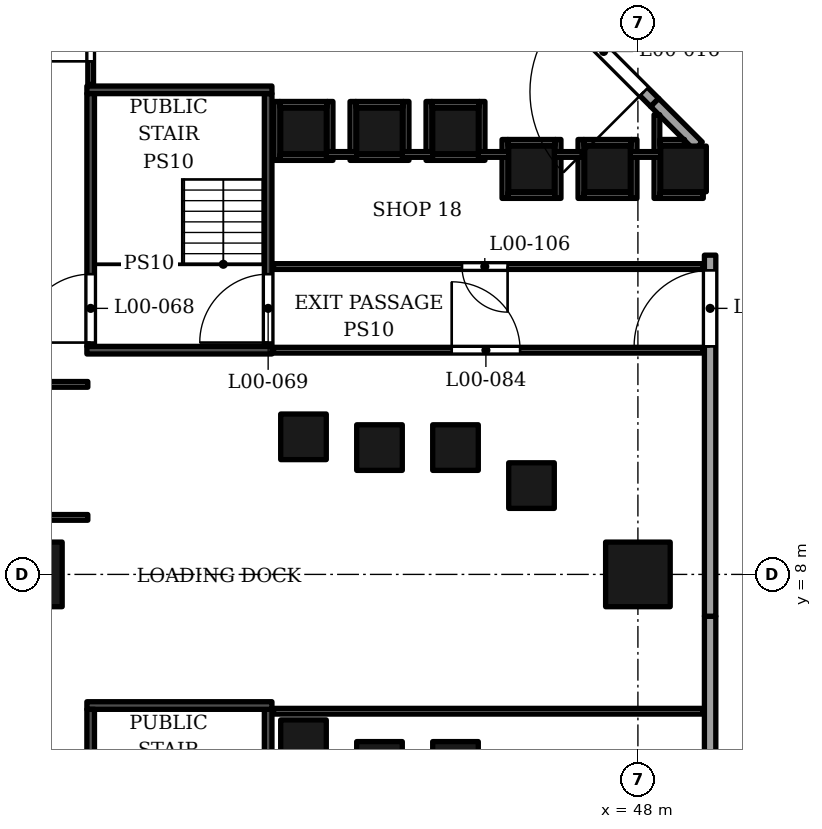
"""IFC4 building model, lengths in metres.
Left out: names, types, materials, properties, quantities, classifications, styles, units other than length and angle.
Written with IfcOpenShell. Run it as: python <this file> out.ifc"""

import sys

from ifc_helpers import new_model, si_unit, direction, frame, frame_2d, origin, origin_2d, place, context, subcontext, project, spatial, rectangle, extrude, element, fill, save


model = new_model("IFC4")
c1 = context("Model", 3, precision=1e-05, world=origin(), true_north=direction((0.0, 1.0)))
c2 = subcontext(c1, "Body", "Model", "MODEL_VIEW")
j1 = project(units=[si_unit("LENGTHUNIT", "METRE"), si_unit("PLANEANGLEUNIT", "RADIAN")], contexts=[c1])
p1 = place(None, origin())
s1 = spatial("IfcSite", under=j1, at=p1, CompositionType="ELEMENT")
p2 = place(p1, origin())
s2 = spatial("IfcBuilding", under=s1, at=p2, CompositionType="ELEMENT")
p3 = place(p2, origin())
s3 = spatial("IfcBuildingStorey", under=s2, at=p3, CompositionType="ELEMENT", Elevation=0.0)
for number, where, z_axis, x_axis in (
    (1, (32.0, 8.0, 0.0), (0.0, 0.0, 1.0), (1.0, 0.0, 0.0)),
    (2, (48.0, 8.0, 0.0), (0.0, 0.0, 1.0), (1.0, 0.0, 0.0)),
):
    element("IfcColumn", number, at=place(p3, frame(where, z_axis=z_axis, x_axis=x_axis)), inside=s3, PredefinedType="COLUMN", context=c2, shape_type="SweptSolid", body=[
        extrude(rectangle(XDim=1.7, YDim=1.7, at=origin_2d()), origin(), (0.0, 0.0, 1.0), 9.0),
    ])
for number, where, z_axis, x_axis in (
    (3, (39.2, 19.669, 0.0), (0.0, 0.0, 1.0), (1.0, 0.0, 0.0)),
    (4, (39.2, 11.62, 0.0), (0.0, 0.0, 1.0), (1.0, 0.0, 0.0)),
    (5, (39.2, 3.572, 0.0), (0.0, 0.0, 1.0), (1.0, 0.0, 0.0)),
    (6, (41.2, 19.669, 0.0), (0.0, 0.0, 1.0), (1.0, 0.0, 0.0)),
    (7, (41.2, 11.337, 0.0), (0.0, 0.0, 1.0), (1.0, 0.0, 0.0)),
    (8, (41.2, 3.001, 0.0), (0.0, 0.0, 1.0), (1.0, 0.0, 0.0)),
    (9, (43.2, 19.669, 0.0), (0.0, 0.0, 1.0), (1.0, 0.0, 0.0)),
    (10, (43.2, 11.337, 0.0), (0.0, 0.0, 1.0), (1.0, 0.0, 0.0)),
    (11, (43.2, 3.001, 0.0), (0.0, 0.0, 1.0), (1.0, 0.0, 0.0)),
    (12, (45.2, 18.669, 0.0), (0.0, 0.0, 1.0), (1.0, 0.0, 0.0)),
    (13, (45.2, 10.337, 0.0), (0.0, 0.0, 1.0), (1.0, 0.0, 0.0)),
    (14, (47.2, 18.669, 0.0), (0.0, 0.0, 1.0), (1.0, 0.0, 0.0)),
    (15, (49.2, 18.669, 0.0), (0.0, 0.0, 1.0), (1.0, 0.0, 0.0)),
):
    element("IfcColumn", number, at=place(p3, frame(where, z_axis=z_axis, x_axis=x_axis)), inside=s3, PredefinedType="COLUMN", context=c2, shape_type="SweptSolid", body=[
        extrude(rectangle(XDim=1.2, YDim=1.2, at=origin_2d()), origin(), (0.0, 0.0, 1.0), 9.0),
    ])
p4 = place(p3, frame((49.9, -2.523, 0.0), z_axis=(0.0, 0.0, 1.0), x_axis=(0.0, 1.0, 0.0)))
e16 = element("IfcWall", 16, at=p4, inside=s3, PredefinedType="ELEMENTEDWALL", context=c2, shape_type="SweptSolid", body=[
    extrude(rectangle(XDim=9.423, YDim=0.3, at=frame_2d((4.711, 0.0))), origin(), (0.0, 0.0, 1.0), 7.6),
])
p5 = place(p4, frame((0.323, 0.0, 0.0)))
e17 = element("IfcOpeningElement", 17, at=p5, cuts=e16, PredefinedType="OPENING", context=c2, shape_type="SweptSolid", body=[
    extrude(rectangle(XDim=2.0, YDim=2.4, at=frame_2d((1.0, 1.2))), frame((0.0, 0.16, 0.0), z_axis=(0.0, -1.0, 0.0), x_axis=(1.0, 0.0, 0.0)), (0.0, 0.0, 1.0), 0.32),
])
p6 = place(p3, frame((49.9, 6.9, 0.0), z_axis=(0.0, 0.0, 1.0), x_axis=(0.0, 1.0, 0.0)))
e18 = element("IfcWall", 18, at=p6, inside=s3, PredefinedType="ELEMENTEDWALL", context=c2, shape_type="SweptSolid", body=[
    extrude(rectangle(XDim=9.5, YDim=0.3, at=frame_2d((4.75, 0.0))), origin(), (0.0, 0.0, 1.0), 7.6),
])
p7 = place(p6, frame((7.1, 0.0, 0.0)))
e19 = element("IfcOpeningElement", 19, at=p7, cuts=e18, PredefinedType="OPENING", context=c2, shape_type="SweptSolid", body=[
    extrude(rectangle(XDim=2.0, YDim=2.4, at=frame_2d((1.0, 1.2))), frame((0.0, 0.16, 0.0), z_axis=(0.0, -1.0, 0.0), x_axis=(1.0, 0.0, 0.0)), (0.0, 0.0, 1.0), 0.32),
])
p8 = place(p3, frame((48.442, 20.417, 0.0), z_axis=(0.0, 0.0, 1.0), x_axis=(-0.707106781187, 0.707106781187, 0.0)))
e20 = element("IfcWall", 20, at=p8, inside=s3, PredefinedType="ELEMENTEDWALL", context=c2, shape_type="SweptSolid", body=[
    extrude(rectangle(XDim=3.8, YDim=0.3, at=frame_2d((1.9, 0.0))), origin(), (0.0, 0.0, 1.0), 7.6),
])
p9 = place(p8, frame((0.4, 0.0, 0.0)))
e21 = element("IfcOpeningElement", 21, at=p9, cuts=e20, PredefinedType="OPENING", context=c2, shape_type="SweptSolid", body=[
    extrude(rectangle(XDim=3.0, YDim=2.7, at=frame_2d((1.5, 1.35))), frame((0.0, 0.16, 0.0), z_axis=(0.0, -1.0, 0.0), x_axis=(1.0, 0.0, 0.0)), (0.0, 0.0, 1.0), 0.32),
])
p10 = place(p3, frame((49.588, 19.271, 0.0), z_axis=(0.0, 0.0, 1.0), x_axis=(-0.707106781187, 0.707106781187, 0.0)))
e22 = element("IfcWall", 22, at=p10, inside=s3, PredefinedType="SOLIDWALL", context=c2, shape_type="SweptSolid", body=[
    extrude(rectangle(XDim=1.62, YDim=0.3, at=frame_2d((0.81, 0.0))), origin(), (0.0, 0.0, 1.0), 7.6),
])
for number, where, z_axis, x_axis in (
    (23, (49.85, -10.395, 9.0), (0.0, 0.0, 1.0), (0.0, 1.0, 0.0)),
    (24, (49.85, 4.302, 9.0), (0.0, 0.0, 1.0), (0.0, 1.0, 0.0)),
):
    element("IfcWall", number, at=place(p3, frame(where, z_axis=z_axis, x_axis=x_axis)), inside=s3, PredefinedType="PARAPET", context=c2, shape_type="SweptSolid", body=[
        extrude(rectangle(XDim=14.698, YDim=0.3, at=frame_2d((7.349, 0.0))), origin(), (0.0, 0.0, 1.0), 1.1),
    ])
p11 = place(p3, frame((49.745, 19.042, 9.0), z_axis=(0.0, 0.0, 1.0), x_axis=(-0.707092029666, 0.7071215324, 0.0)))
e25 = element("IfcWall", 25, at=p11, inside=s3, PredefinedType="PARAPET", context=c2, shape_type="SweptSolid", body=[
    extrude(rectangle(XDim=8.275, YDim=0.3, at=frame_2d((4.138, 0.0))), origin(), (0.0, 0.0, 1.0), 1.1),
])
p12 = place(p3, frame((33.5, 4.55, 0.0), z_axis=(0.0, 0.0, 1.0), x_axis=(1.0, 0.0, 0.0)))
e26 = element("IfcWall", 26, at=p12, inside=s3, PredefinedType="SOLIDWALL", context=c2, shape_type="SweptSolid", body=[
    extrude(rectangle(XDim=4.87, YDim=0.2, at=frame_2d((2.435, 0.0))), origin(), (0.0, 0.0, 1.0), 8.5),
])
p13 = place(p3, frame((33.6, -2.2, 0.0), z_axis=(0.0, 0.0, 1.0), x_axis=(0.0, 1.0, 0.0)))
e27 = element("IfcWall", 27, at=p13, inside=s3, PredefinedType="SOLIDWALL", context=c2, shape_type="SweptSolid", body=[
    extrude(rectangle(XDim=6.65, YDim=0.2, at=frame_2d((3.325, 0.0))), origin(), (0.0, 0.0, 1.0), 8.5),
])
p14 = place(p13, frame((0.1, 0.0, 0.0)))
e28 = element("IfcOpeningElement", 28, at=p14, cuts=e27, PredefinedType="OPENING", context=c2, shape_type="SweptSolid", body=[
    extrude(rectangle(XDim=1.8, YDim=2.4, at=frame_2d((0.9, 1.2))), frame((0.0, 0.11, 0.0), z_axis=(0.0, -1.0, 0.0), x_axis=(1.0, 0.0, 0.0)), (0.0, 0.0, 1.0), 0.22),
])
p15 = place(p3, frame((38.27, -2.2, 0.0), z_axis=(0.0, 0.0, 1.0), x_axis=(0.0, 1.0, 0.0)))
e29 = element("IfcWall", 29, at=p15, inside=s3, PredefinedType="SOLIDWALL", context=c2, shape_type="SweptSolid", body=[
    extrude(rectangle(XDim=6.65, YDim=0.2, at=frame_2d((3.325, 0.0))), origin(), (0.0, 0.0, 1.0), 8.5),
])
p16 = place(p15, frame((0.1, 0.0, 0.0)))
e30 = element("IfcOpeningElement", 30, at=p16, cuts=e29, PredefinedType="OPENING", context=c2, shape_type="SweptSolid", body=[
    extrude(rectangle(XDim=1.8, YDim=2.4, at=frame_2d((0.9, 1.2))), frame((0.0, 0.11, 0.0), z_axis=(0.0, -1.0, 0.0), x_axis=(1.0, 0.0, 0.0)), (0.0, 0.0, 1.0), 0.22),
])
for number, where, z_axis, x_axis in (
    (31, (33.5, 13.9, 0.0), (0.0, 0.0, 1.0), (1.0, 0.0, 0.0)),
    (32, (33.5, 20.75, 0.0), (0.0, 0.0, 1.0), (1.0, 0.0, 0.0)),
):
    element("IfcWall", number, at=place(p3, frame(where, z_axis=z_axis, x_axis=x_axis)), inside=s3, PredefinedType="SOLIDWALL", context=c2, shape_type="SweptSolid", body=[
        extrude(rectangle(XDim=4.87, YDim=0.2, at=frame_2d((2.435, 0.0))), origin(), (0.0, 0.0, 1.0), 8.5),
    ])
p17 = place(p3, frame((33.6, 14.0, 0.0), z_axis=(0.0, 0.0, 1.0), x_axis=(0.0, 1.0, 0.0)))
e33 = element("IfcWall", 33, at=p17, inside=s3, PredefinedType="SOLIDWALL", context=c2, shape_type="SweptSolid", body=[
    extrude(rectangle(XDim=6.65, YDim=0.2, at=frame_2d((3.325, 0.0))), origin(), (0.0, 0.0, 1.0), 8.5),
])
p18 = place(p17, frame((0.1, 0.0, 0.0)))
e34 = element("IfcOpeningElement", 34, at=p18, cuts=e33, PredefinedType="OPENING", context=c2, shape_type="SweptSolid", body=[
    extrude(rectangle(XDim=1.8, YDim=2.4, at=frame_2d((0.9, 1.2))), frame((0.0, 0.11, 0.0), z_axis=(0.0, -1.0, 0.0), x_axis=(1.0, 0.0, 0.0)), (0.0, 0.0, 1.0), 0.22),
])
p19 = place(p3, frame((38.27, 14.0, 0.0), z_axis=(0.0, 0.0, 1.0), x_axis=(0.0, 1.0, 0.0)))
e35 = element("IfcWall", 35, at=p19, inside=s3, PredefinedType="SOLIDWALL", context=c2, shape_type="SweptSolid", body=[
    extrude(rectangle(XDim=6.65, YDim=0.2, at=frame_2d((3.325, 0.0))), origin(), (0.0, 0.0, 1.0), 8.5),
])
p20 = place(p19, frame((0.1, 0.0, 0.0)))
e36 = element("IfcOpeningElement", 36, at=p20, cuts=e35, PredefinedType="OPENING", context=c2, shape_type="SweptSolid", body=[
    extrude(rectangle(XDim=1.8, YDim=2.4, at=frame_2d((0.9, 1.2))), frame((0.0, 0.11, 0.0), z_axis=(0.0, -1.0, 0.0), x_axis=(1.0, 0.0, 0.0)), (0.0, 0.0, 1.0), 0.22),
])
p21 = place(p3, frame((38.41, 4.4, 0.0), z_axis=(0.0, 0.0, 1.0), x_axis=(1.0, 0.0, 0.0)))
e37 = element("IfcWall", 37, at=p21, inside=s3, PredefinedType="PARTITIONING", context=c2, shape_type="SweptSolid", body=[
    extrude(rectangle(XDim=11.31, YDim=0.15, at=frame_2d((5.655, 0.0))), origin(), (0.0, 0.0, 1.0), 7.6),
])
p22 = place(p3, frame((18.225, 9.5, 0.0), z_axis=(0.0, 0.0, 1.0), x_axis=(1.0, 0.0, 0.0)))
e38 = element("IfcWall", 38, at=p22, inside=s3, PredefinedType="PARTITIONING", context=c2, shape_type="SweptSolid", body=[
    extrude(rectangle(XDim=15.3, YDim=0.15, at=frame_2d((7.65, 0.0))), origin(), (0.0, 0.0, 1.0), 7.3),
])
p23 = place(p3, frame((25.886, 13.0, 0.0), z_axis=(0.0, 0.0, 1.0), x_axis=(1.0, 0.0, 0.0)))
e39 = element("IfcWall", 39, at=p23, inside=s3, PredefinedType="PARTITIONING", context=c2, shape_type="SweptSolid", body=[
    extrude(rectangle(XDim=7.639, YDim=0.15, at=frame_2d((3.819, 0.0))), origin(), (0.0, 0.0, 1.0), 7.3),
])
p24 = place(p3, frame((38.41, 13.899, 0.0), z_axis=(0.0, 0.0, 1.0), x_axis=(1.0, 0.0, 0.0)))
e40 = element("IfcWall", 40, at=p24, inside=s3, PredefinedType="PARTITIONING", context=c2, shape_type="SweptSolid", body=[
    extrude(rectangle(XDim=11.31, YDim=0.151, at=frame_2d((5.655, 0.0))), origin(), (0.0, 0.0, 1.0), 7.6),
])
p25 = place(p24, frame((4.69, 0.0, 0.0)))
e41 = element("IfcOpeningElement", 41, at=p25, cuts=e40, PredefinedType="OPENING", context=c2, shape_type="SweptSolid", body=[
    extrude(rectangle(XDim=1.8, YDim=2.1, at=frame_2d((0.9, 1.05))), frame((0.0, 0.085, 0.0), z_axis=(0.0, -1.0, 0.0), x_axis=(1.0, 0.0, 0.0)), (0.0, 0.0, 1.0), 0.171),
])
p26 = place(p3, frame((38.41, 16.101, 0.0), z_axis=(0.0, 0.0, 1.0), x_axis=(1.0, 0.0, 0.0)))
e42 = element("IfcWall", 42, at=p26, inside=s3, PredefinedType="PARTITIONING", context=c2, shape_type="SweptSolid", body=[
    extrude(rectangle(XDim=11.31, YDim=0.151, at=frame_2d((5.655, 0.0))), origin(), (0.0, 0.0, 1.0), 7.6),
])
p27 = place(p26, frame((4.961, 0.0, 0.0)))
e43 = element("IfcOpeningElement", 43, at=p27, cuts=e42, PredefinedType="OPENING", context=c2, shape_type="SweptSolid", body=[
    extrude(rectangle(XDim=1.2, YDim=2.1, at=frame_2d((0.6, 1.05))), frame((0.0, 0.085, 0.0), z_axis=(0.0, -1.0, 0.0), x_axis=(1.0, 0.0, 0.0)), (0.0, 0.0, 1.0), 0.171),
])
p28 = place(p3, frame((44.5, 17.894, 0.0), z_axis=(0.0, 0.0, 1.0), x_axis=(0.0, 1.0, 0.0)))
e44 = element("IfcWall", 44, at=p28, inside=s3, PredefinedType="PARTITIONING", context=c2, shape_type="SweptSolid", body=[
    extrude(rectangle(XDim=1.55, YDim=0.15, at=frame_2d((0.775, 0.0))), origin(), (0.0, 0.0, 1.0), 8.5),
])
p29 = place(p3, frame((44.575, 17.969, 0.0), z_axis=(0.0, 0.0, 1.0), x_axis=(1.0, 0.0, 0.0)))
e45 = element("IfcWall", 45, at=p29, inside=s3, PredefinedType="PARTITIONING", context=c2, shape_type="SweptSolid", body=[
    extrude(rectangle(XDim=1.25, YDim=0.15, at=frame_2d((0.625, 0.0))), origin(), (0.0, 0.0, 1.0), 8.5),
])
for number, where, z_axis, x_axis in (
    (46, (45.9, 17.894, 0.0), (0.0, 0.0, 1.0), (0.0, 1.0, 0.0)),
    (47, (46.5, 17.894, 0.0), (0.0, 0.0, 1.0), (0.0, 1.0, 0.0)),
):
    element("IfcWall", number, at=place(p3, frame(where, z_axis=z_axis, x_axis=x_axis)), inside=s3, PredefinedType="PARTITIONING", context=c2, shape_type="SweptSolid", body=[
        extrude(rectangle(XDim=1.55, YDim=0.15, at=frame_2d((0.775, 0.0))), origin(), (0.0, 0.0, 1.0), 8.5),
    ])
p30 = place(p3, frame((46.575, 17.969, 0.0), z_axis=(0.0, 0.0, 1.0), x_axis=(1.0, 0.0, 0.0)))
e48 = element("IfcWall", 48, at=p30, inside=s3, PredefinedType="PARTITIONING", context=c2, shape_type="SweptSolid", body=[
    extrude(rectangle(XDim=1.25, YDim=0.15, at=frame_2d((0.625, 0.0))), origin(), (0.0, 0.0, 1.0), 7.6),
])
p31 = place(p3, frame((47.9, 17.894, 0.0), z_axis=(0.0, 0.0, 1.0), x_axis=(0.0, 1.0, 0.0)))
e49 = element("IfcWall", 49, at=p31, inside=s3, PredefinedType="PARTITIONING", context=c2, shape_type="SweptSolid", body=[
    extrude(rectangle(XDim=1.55, YDim=0.15, at=frame_2d((0.775, 0.0))), origin(), (0.0, 0.0, 1.0), 7.6),
])
p32 = place(p3, frame((48.5, 17.894, 0.0), z_axis=(0.0, 0.0, 1.0), x_axis=(0.0, 1.0, 0.0)))
e50 = element("IfcWall", 50, at=p32, inside=s3, PredefinedType="PARTITIONING", context=c2, shape_type="SweptSolid", body=[
    extrude(rectangle(XDim=2.202, YDim=0.15, at=frame_2d((1.101, 0.0))), origin(), (0.0, 0.0, 1.0), 8.5),
])
p33 = place(p3, frame((48.575, 17.969, 0.0), z_axis=(0.0, 0.0, 1.0), x_axis=(1.0, 0.0, 0.0)))
e51 = element("IfcWall", 51, at=p33, inside=s3, PredefinedType="PARTITIONING", context=c2, shape_type="SweptSolid", body=[
    extrude(rectangle(XDim=1.145, YDim=0.15, at=frame_2d((0.573, 0.0))), origin(), (0.0, 0.0, 1.0), 8.5),
])
p34 = place(p3, frame((38.5, 18.894, 0.0), z_axis=(0.0, 0.0, 1.0), x_axis=(0.0, 1.0, 0.0)))
e52 = element("IfcWall", 52, at=p34, inside=s3, PredefinedType="PARTITIONING", context=c2, shape_type="SweptSolid", body=[
    extrude(rectangle(XDim=1.55, YDim=0.15, at=frame_2d((0.775, 0.0))), origin(), (0.0, 0.0, 1.0), 8.5),
])
p35 = place(p3, frame((38.575, 18.969, 0.0), z_axis=(0.0, 0.0, 1.0), x_axis=(1.0, 0.0, 0.0)))
e53 = element("IfcWall", 53, at=p35, inside=s3, PredefinedType="PARTITIONING", context=c2, shape_type="SweptSolid", body=[
    extrude(rectangle(XDim=1.25, YDim=0.15, at=frame_2d((0.625, 0.0))), origin(), (0.0, 0.0, 1.0), 8.5),
])
for number, where, z_axis, x_axis in (
    (54, (39.9, 18.894, 0.0), (0.0, 0.0, 1.0), (0.0, 1.0, 0.0)),
    (55, (40.5, 18.894, 0.0), (0.0, 0.0, 1.0), (0.0, 1.0, 0.0)),
):
    element("IfcWall", number, at=place(p3, frame(where, z_axis=z_axis, x_axis=x_axis)), inside=s3, PredefinedType="PARTITIONING", context=c2, shape_type="SweptSolid", body=[
        extrude(rectangle(XDim=1.55, YDim=0.15, at=frame_2d((0.775, 0.0))), origin(), (0.0, 0.0, 1.0), 8.5),
    ])
p36 = place(p3, frame((40.575, 18.969, 0.0), z_axis=(0.0, 0.0, 1.0), x_axis=(1.0, 0.0, 0.0)))
e56 = element("IfcWall", 56, at=p36, inside=s3, PredefinedType="PARTITIONING", context=c2, shape_type="SweptSolid", body=[
    extrude(rectangle(XDim=1.25, YDim=0.15, at=frame_2d((0.625, 0.0))), origin(), (0.0, 0.0, 1.0), 8.5),
])
for number, where, z_axis, x_axis in (
    (57, (41.9, 18.894, 0.0), (0.0, 0.0, 1.0), (0.0, 1.0, 0.0)),
    (58, (42.5, 18.894, 0.0), (0.0, 0.0, 1.0), (0.0, 1.0, 0.0)),
):
    element("IfcWall", number, at=place(p3, frame(where, z_axis=z_axis, x_axis=x_axis)), inside=s3, PredefinedType="PARTITIONING", context=c2, shape_type="SweptSolid", body=[
        extrude(rectangle(XDim=1.55, YDim=0.15, at=frame_2d((0.775, 0.0))), origin(), (0.0, 0.0, 1.0), 8.5),
    ])
p37 = place(p3, frame((42.575, 18.969, 0.0), z_axis=(0.0, 0.0, 1.0), x_axis=(1.0, 0.0, 0.0)))
e59 = element("IfcWall", 59, at=p37, inside=s3, PredefinedType="PARTITIONING", context=c2, shape_type="SweptSolid", body=[
    extrude(rectangle(XDim=1.25, YDim=0.15, at=frame_2d((0.625, 0.0))), origin(), (0.0, 0.0, 1.0), 8.5),
])
p38 = place(p3, frame((43.9, 18.894, 0.0), z_axis=(0.0, 0.0, 1.0), x_axis=(0.0, 1.0, 0.0)))
e60 = element("IfcWall", 60, at=p38, inside=s3, PredefinedType="PARTITIONING", context=c2, shape_type="SweptSolid", body=[
    extrude(rectangle(XDim=1.55, YDim=0.15, at=frame_2d((0.775, 0.0))), origin(), (0.0, 0.0, 1.0), 8.5),
])
for number, where, z_axis, x_axis in (
    (61, (39.8, 19.05, 0.0), (0.0, 0.0, 1.0), (1.0, 0.0, 0.0)),
    (62, (41.8, 19.05, 0.0), (0.0, 0.0, 1.0), (1.0, 0.0, 0.0)),
    (63, (43.8, 19.05, 0.0), (0.0, 0.0, 1.0), (1.0, 0.0, 0.0)),
    (64, (45.8, 19.05, 0.0), (0.0, 0.0, 1.0), (1.0, 0.0, 0.0)),
    (65, (47.8, 19.05, 0.0), (0.0, 0.0, 1.0), (1.0, 0.0, 0.0)),
):
    element("IfcWall", number, at=place(p3, frame(where, z_axis=z_axis, x_axis=x_axis)), inside=s3, PredefinedType="PARTITIONING", context=c2, shape_type="SweptSolid", body=[
        extrude(rectangle(XDim=0.8, YDim=0.15, at=frame_2d((0.4, 0.0))), origin(), (0.0, 0.0, 1.0), 8.5),
    ])
p39 = place(p3, frame((44.575, 19.369, 0.0), z_axis=(0.0, 0.0, 1.0), x_axis=(1.0, 0.0, 0.0)))
e66 = element("IfcWall", 66, at=p39, inside=s3, PredefinedType="PARTITIONING", context=c2, shape_type="SweptSolid", body=[
    extrude(rectangle(XDim=1.25, YDim=0.15, at=frame_2d((0.625, 0.0))), origin(), (0.0, 0.0, 1.0), 8.5),
])
p40 = place(p3, frame((46.575, 19.369, 0.0), z_axis=(0.0, 0.0, 1.0), x_axis=(1.0, 0.0, 0.0)))
e67 = element("IfcWall", 67, at=p40, inside=s3, PredefinedType="PARTITIONING", context=c2, shape_type="SweptSolid", body=[
    extrude(rectangle(XDim=1.25, YDim=0.15, at=frame_2d((0.625, 0.0))), origin(), (0.0, 0.0, 1.0), 7.6),
])
p41 = place(p3, frame((48.575, 19.369, 0.0), z_axis=(0.0, 0.0, 1.0), x_axis=(1.0, 0.0, 0.0)))
e68 = element("IfcWall", 68, at=p41, inside=s3, PredefinedType="PARTITIONING", context=c2, shape_type="SweptSolid", body=[
    extrude(rectangle(XDim=0.652, YDim=0.15, at=frame_2d((0.326, 0.0))), origin(), (0.0, 0.0, 1.0), 8.5),
])
for number, where, z_axis, x_axis in (
    (69, (38.575, 20.369, 0.0), (0.0, 0.0, 1.0), (1.0, 0.0, 0.0)),
    (70, (40.575, 20.369, 0.0), (0.0, 0.0, 1.0), (1.0, 0.0, 0.0)),
    (71, (42.575, 20.369, 0.0), (0.0, 0.0, 1.0), (1.0, 0.0, 0.0)),
):
    element("IfcWall", number, at=place(p3, frame(where, z_axis=z_axis, x_axis=x_axis)), inside=s3, PredefinedType="PARTITIONING", context=c2, shape_type="SweptSolid", body=[
        extrude(rectangle(XDim=1.25, YDim=0.15, at=frame_2d((0.625, 0.0))), origin(), (0.0, 0.0, 1.0), 8.5),
    ])
p42 = place(p3, frame((33.6, 20.89, 0.0), z_axis=(0.0, 0.0, 1.0), x_axis=(0.0, 1.0, 0.0)))
e72 = element("IfcWall", 72, at=p42, inside=s3, PredefinedType="PARTITIONING", context=c2, shape_type="SweptSolid", body=[
    extrude(rectangle(XDim=3.88, YDim=0.15, at=frame_2d((1.94, 0.0))), origin(), (0.0, 0.0, 1.0), 7.6),
])
p43 = place(p42, frame((0.61, 0.0, 0.0)))
e73 = element("IfcOpeningElement", 73, at=p43, cuts=e72, PredefinedType="OPENING", context=c2, shape_type="SweptSolid", body=[
    extrude(rectangle(XDim=1.2, YDim=2.1, at=frame_2d((0.6, 1.05))), frame((0.0, 0.085, 0.0), z_axis=(0.0, -1.0, 0.0), x_axis=(1.0, 0.0, 0.0)), (0.0, 0.0, 1.0), 0.17),
])
p44 = place(p7, origin())
e74 = element("IfcDoor", 74, at=p44, inside=s3, OperationType="DOUBLE_DOOR_SINGLE_SWING", PredefinedType="DOOR", context=c2, shape_type="SweptSolid", body=[
    extrude(rectangle(XDim=2.0, YDim=2.4, at=frame_2d((1.0, 1.2))), frame((0.0, 0.025, 0.0), z_axis=(0.0, -1.0, 0.0), x_axis=(1.0, 0.0, 0.0)), (0.0, 0.0, 1.0), 0.05),
])
fill(e19, e74)
p45 = place(p9, origin())
e75 = element("IfcDoor", 75, at=p45, inside=s3, OperationType="DOUBLE_DOOR_SINGLE_SWING", PredefinedType="DOOR", context=c2, shape_type="SweptSolid", body=[
    extrude(rectangle(XDim=3.0, YDim=2.7, at=frame_2d((1.5, 1.35))), frame((0.0, 0.025, 0.0), z_axis=(0.0, -1.0, 0.0), x_axis=(1.0, 0.0, 0.0)), (0.0, 0.0, 1.0), 0.05),
])
fill(e21, e75)
p46 = place(p18, origin())
e76 = element("IfcDoor", 76, at=p46, inside=s3, OperationType="DOUBLE_DOOR_SINGLE_SWING", PredefinedType="DOOR", context=c2, shape_type="SweptSolid", body=[
    extrude(rectangle(XDim=1.8, YDim=2.4, at=frame_2d((0.9, 1.2))), frame((0.0, 0.025, 0.0), z_axis=(0.0, -1.0, 0.0), x_axis=(1.0, 0.0, 0.0)), (0.0, 0.0, 1.0), 0.05),
])
fill(e34, e76)
p47 = place(p20, origin())
e77 = element("IfcDoor", 77, at=p47, inside=s3, OperationType="DOUBLE_DOOR_SINGLE_SWING", PredefinedType="DOOR", context=c2, shape_type="SweptSolid", body=[
    extrude(rectangle(XDim=1.8, YDim=2.4, at=frame_2d((0.9, 1.2))), frame((0.0, 0.025, 0.0), z_axis=(0.0, -1.0, 0.0), x_axis=(1.0, 0.0, 0.0)), (0.0, 0.0, 1.0), 0.05),
])
fill(e36, e77)
p48 = place(p43, origin())
e78 = element("IfcDoor", 78, at=p48, inside=s3, OperationType="SINGLE_SWING_LEFT", PredefinedType="DOOR", context=c2, shape_type="SweptSolid", body=[
    extrude(rectangle(XDim=1.2, YDim=2.1, at=frame_2d((0.6, 1.05))), frame((0.0, 0.025, 0.0), z_axis=(0.0, -1.0, 0.0), x_axis=(1.0, 0.0, 0.0)), (0.0, 0.0, 1.0), 0.05),
])
fill(e73, e78)
p49 = place(p25, origin())
e79 = element("IfcDoor", 79, at=p49, inside=s3, OperationType="DOUBLE_DOOR_SINGLE_SWING", PredefinedType="DOOR", context=c2, shape_type="SweptSolid", body=[
    extrude(rectangle(XDim=1.8, YDim=2.1, at=frame_2d((0.9, 1.05))), frame((0.0, 0.025, 0.0), z_axis=(0.0, -1.0, 0.0), x_axis=(1.0, 0.0, 0.0)), (0.0, 0.0, 1.0), 0.05),
])
fill(e41, e79)
p50 = place(p27, origin())
e80 = element("IfcDoor", 80, at=p50, inside=s3, OperationType="SINGLE_SWING_RIGHT", PredefinedType="DOOR", context=c2, shape_type="SweptSolid", body=[
    extrude(rectangle(XDim=1.2, YDim=2.1, at=frame_2d((0.6, 1.05))), frame((0.0, 0.025, 0.0), z_axis=(0.0, -1.0, 0.0), x_axis=(1.0, 0.0, 0.0)), (0.0, 0.0, 1.0), 0.05),
])
fill(e43, e80)
save(model, sys.argv[1])
